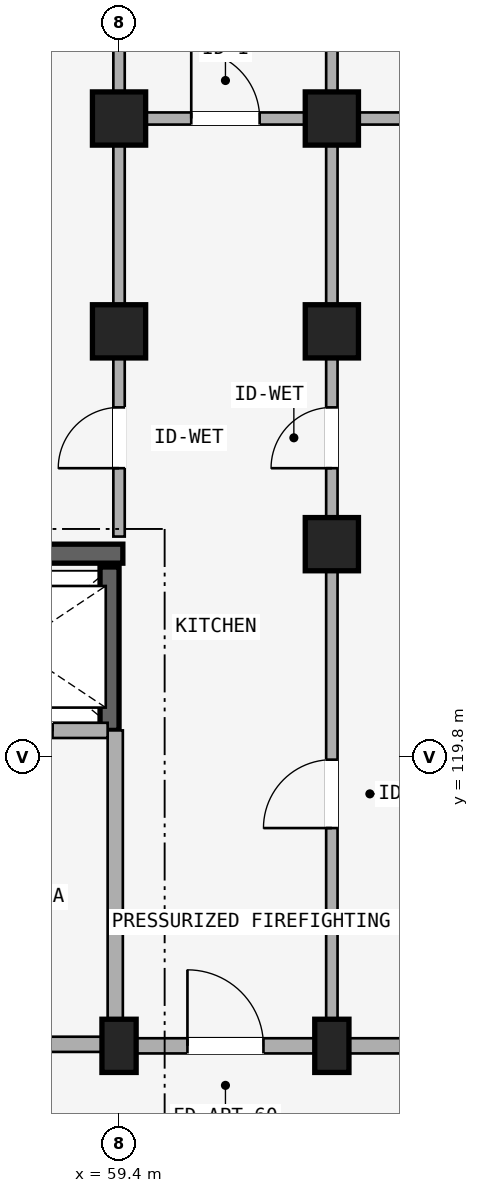
"""IFC4 building model, lengths in metres.
Left out: names, types, materials, properties, quantities, classifications, styles, units other than length and angle.
Written with IfcOpenShell. Run it as: python <this file> out.ifc"""

import sys

from ifc_helpers import new_model, si_unit, direction, frame, frame_2d, origin, origin_2d, place, context, subcontext, project, spatial, rectangle, extrude, element, fill, save


model = new_model("IFC4")
c1 = context("Model", 3, precision=1e-05, world=origin(), true_north=direction((0.0, 1.0)))
c2 = subcontext(c1, "Body", "Model", "MODEL_VIEW")
j1 = project(units=[si_unit("LENGTHUNIT", "METRE"), si_unit("PLANEANGLEUNIT", "RADIAN")], contexts=[c1])
p1 = place(None, origin())
s1 = spatial("IfcSite", under=j1, at=p1, CompositionType="ELEMENT")
p2 = place(p1, origin())
s2 = spatial("IfcBuilding", under=s1, at=p2, CompositionType="ELEMENT")
p3 = place(p2, frame((0.0, 0.0, 21.3)))
s3 = spatial("IfcBuildingStorey", under=s2, at=p3, CompositionType="ELEMENT", Elevation=21.3)
p4 = place(p3, frame((56.65, 122.475, 0.0), z_axis=(0.0, 0.0, 1.0), x_axis=(1.0, 0.0, 0.0)))
e1 = element("IfcWall", 1, at=p4, inside=s3, PredefinedType="SHEAR", context=c2, shape_type="SweptSolid", body=[
    extrude(rectangle(XDim=2.8, YDim=0.25, at=frame_2d((1.4, 0.0))), origin(), (0.0, 0.0, 1.0), 2.93),
])
p5 = place(p3, frame((59.275, 120.15, 0.0), z_axis=(0.0, 0.0, 1.0), x_axis=(0.0, 1.0, 0.0)))
e2 = element("IfcWall", 2, at=p5, inside=s3, PredefinedType="SHEAR", context=c2, shape_type="SweptSolid", body=[
    extrude(rectangle(XDim=2.15, YDim=0.25, at=frame_2d((1.075, 0.0))), origin(), (0.0, 0.0, 1.0), 2.93),
])
p6 = place(p3, frame((59.4, 116.0, 0.0), z_axis=(0.0, 0.0, 1.0), x_axis=(1.0, 0.0, 0.0)))
e3 = element("IfcColumn", 3, at=p6, inside=s3, PredefinedType="COLUMN", context=c2, shape_type="SweptSolid", body=[
    extrude(rectangle(XDim=0.45, YDim=0.7, at=origin_2d()), origin(), (0.0, 0.0, 1.0), 2.93),
])
for number, where, z_axis, x_axis in (
    (4, (59.4, 125.4, 0.0), (0.0, 0.0, 1.0), (1.0, 0.0, 0.0)),
    (5, (59.4, 128.2, 0.0), (0.0, 0.0, 1.0), (1.0, 0.0, 0.0)),
):
    element("IfcColumn", number, at=place(p3, frame(where, z_axis=z_axis, x_axis=x_axis)), inside=s3, PredefinedType="COLUMN", context=c2, shape_type="SweptSolid", body=[
        extrude(rectangle(XDim=0.7, YDim=0.7, at=origin_2d()), origin(), (0.0, 0.0, 1.0), 2.93),
    ])
p7 = place(p3, frame((62.2, 116.0, 0.0), z_axis=(0.0, 0.0, 1.0), x_axis=(1.0, 0.0, 0.0)))
e6 = element("IfcColumn", 6, at=p7, inside=s3, PredefinedType="COLUMN", context=c2, shape_type="SweptSolid", body=[
    extrude(rectangle(XDim=0.45, YDim=0.7, at=origin_2d()), origin(), (0.0, 0.0, 1.0), 2.93),
])
for number, where, z_axis, x_axis in (
    (7, (62.2, 122.6, 0.0), (0.0, 0.0, 1.0), (1.0, 0.0, 0.0)),
    (8, (62.2, 125.4, 0.0), (0.0, 0.0, 1.0), (1.0, 0.0, 0.0)),
    (9, (62.2, 128.2, 0.0), (0.0, 0.0, 1.0), (1.0, 0.0, 0.0)),
):
    element("IfcColumn", number, at=place(p3, frame(where, z_axis=z_axis, x_axis=x_axis)), inside=s3, PredefinedType="COLUMN", context=c2, shape_type="SweptSolid", body=[
        extrude(rectangle(XDim=0.7, YDim=0.7, at=origin_2d()), origin(), (0.0, 0.0, 1.0), 2.93),
    ])
p8 = place(p3, frame((53.7, 116.02, 0.0), z_axis=(0.0, 0.0, 1.0), x_axis=(1.0, 0.0, 0.0)))
e10 = element("IfcWall", 10, at=p8, inside=s3, PredefinedType="STANDARD", context=c2, shape_type="SweptSolid", body=[
    extrude(rectangle(XDim=5.65, YDim=0.2, at=frame_2d((2.825, 0.0))), origin(), (0.0, 0.0, 1.0), 2.372),
])
p9 = place(p8, frame((1.923, 0.0, 0.0)))
e11 = element("IfcOpeningElement", 11, at=p9, cuts=e10, PredefinedType="OPENING", context=c2, shape_type="SweptSolid", body=[
    extrude(rectangle(XDim=1.24, YDim=2.15, at=frame_2d((0.62, 1.075))), frame((0.0, 0.11, 0.0), z_axis=(0.0, -1.0, 0.0), x_axis=(1.0, 0.0, 0.0)), (0.0, 0.0, 1.0), 0.22),
])
p10 = place(p3, frame((59.35, 116.02, 0.0), z_axis=(0.0, 0.0, 1.0), x_axis=(0.0, 1.0, 0.0)))
e12 = element("IfcWall", 12, at=p10, inside=s3, PredefinedType="STANDARD", context=c2, shape_type="SweptSolid", body=[
    extrude(rectangle(XDim=4.13, YDim=0.2, at=frame_2d((2.065, 0.0))), origin(), (0.0, 0.0, 1.0), 2.372),
])
p11 = place(p3, frame((56.7, 120.15, 0.0), z_axis=(0.0, 0.0, 1.0), x_axis=(1.0, 0.0, 0.0)))
e13 = element("IfcWall", 13, at=p11, inside=s3, PredefinedType="STANDARD", context=c2, shape_type="SweptSolid", body=[
    extrude(rectangle(XDim=2.55, YDim=0.2, at=frame_2d((1.275, 0.0))), origin(), (0.0, 0.0, 1.0), 2.372),
])
p12 = place(p11, frame((0.725, 0.0, 0.0)))
e14 = element("IfcOpeningElement", 14, at=p12, cuts=e13, PredefinedType="OPENING", context=c2, shape_type="SweptSolid", body=[
    extrude(rectangle(XDim=1.1, YDim=2.15, at=frame_2d((0.55, 1.075))), frame((0.0, 0.11, 0.0), z_axis=(0.0, -1.0, 0.0), x_axis=(1.0, 0.0, 0.0)), (0.0, 0.0, 1.0), 0.22),
])
p13 = place(p3, frame((59.4, 116.0, 0.0), z_axis=(0.0, 0.0, 1.0), x_axis=(1.0, 0.0, 0.0)))
e15 = element("IfcWall", 15, at=p13, inside=s3, PredefinedType="STANDARD", context=c2, shape_type="SweptSolid", body=[
    extrude(rectangle(XDim=2.8, YDim=0.2, at=frame_2d((1.4, 0.0))), origin(), (0.0, 0.0, 1.0), 2.372),
])
p14 = place(p13, frame((0.9, 0.0, 0.0)))
e16 = element("IfcOpeningElement", 16, at=p14, cuts=e15, PredefinedType="OPENING", context=c2, shape_type="SweptSolid", body=[
    extrude(rectangle(XDim=1.0, YDim=2.15, at=frame_2d((0.5, 1.075))), frame((0.0, 0.11, 0.0), z_axis=(0.0, -1.0, 0.0), x_axis=(1.0, 0.0, 0.0)), (0.0, 0.0, 1.0), 0.22),
])
p15 = place(p3, frame((59.48, 128.2, 0.0), z_axis=(0.0, 0.0, 1.0), x_axis=(1.0, 0.0, 0.0)))
e17 = element("IfcWall", 17, at=p15, inside=s3, PredefinedType="PLUMBINGWALL", context=c2, shape_type="SweptSolid", body=[
    extrude(rectangle(XDim=2.64, YDim=0.16, at=frame_2d((1.32, 0.0))), origin(), (0.0, 0.0, 1.0), 2.372),
])
p16 = place(p15, frame((0.87, 0.0, 0.0)))
e18 = element("IfcOpeningElement", 18, at=p16, cuts=e17, PredefinedType="OPENING", context=c2, shape_type="SweptSolid", body=[
    extrude(rectangle(XDim=0.9, YDim=2.1, at=frame_2d((0.45, 1.05))), frame((0.0, 0.09, 0.0), z_axis=(0.0, -1.0, 0.0), x_axis=(1.0, 0.0, 0.0)), (0.0, 0.0, 1.0), 0.18),
])
p17 = place(p3, frame((62.2, 116.0, 0.0), z_axis=(0.0, 0.0, 1.0), x_axis=(1.0, 0.0, 0.0)))
e19 = element("IfcWall", 19, at=p17, inside=s3, PredefinedType="STANDARD", context=c2, shape_type="SweptSolid", body=[
    extrude(rectangle(XDim=2.8, YDim=0.2, at=frame_2d((1.4, 0.0))), origin(), (0.0, 0.0, 1.0), 2.372),
])
p18 = place(p3, frame((62.28, 128.2, 0.0), z_axis=(0.0, 0.0, 1.0), x_axis=(1.0, 0.0, 0.0)))
e20 = element("IfcWall", 20, at=p18, inside=s3, PredefinedType="PLUMBINGWALL", context=c2, shape_type="SweptSolid", body=[
    extrude(rectangle(XDim=2.64, YDim=0.16, at=frame_2d((1.32, 0.0))), origin(), (0.0, 0.0, 1.0), 2.372),
])
p19 = place(p18, frame((0.92, 0.0, 0.0)))
e21 = element("IfcOpeningElement", 21, at=p19, cuts=e20, PredefinedType="OPENING", context=c2, shape_type="SweptSolid", body=[
    extrude(rectangle(XDim=0.8, YDim=2.1, at=frame_2d((0.4, 1.05))), frame((0.0, 0.09, 0.0), z_axis=(0.0, -1.0, 0.0), x_axis=(1.0, 0.0, 0.0)), (0.0, 0.0, 1.0), 0.18),
])
p20 = place(p3, frame((59.4, 122.7, 0.0), z_axis=(0.0, 0.0, 1.0), x_axis=(0.0, 1.0, 0.0)))
e22 = element("IfcWall", 22, at=p20, inside=s3, PredefinedType="PARTITIONING", context=c2, shape_type="SweptSolid", body=[
    extrude(rectangle(XDim=10.82, YDim=0.15, at=frame_2d((5.41, 0.0))), origin(), (0.0, 0.0, 1.0), 2.372),
])
p21 = place(p20, frame((0.899, 0.0, 0.0)))
e23 = element("IfcOpeningElement", 23, at=p21, cuts=e22, PredefinedType="OPENING", context=c2, shape_type="SweptSolid", body=[
    extrude(rectangle(XDim=0.8, YDim=2.1, at=frame_2d((0.4, 1.05))), frame((0.0, 0.085, 0.0), z_axis=(0.0, -1.0, 0.0), x_axis=(1.0, 0.0, 0.0)), (0.0, 0.0, 1.0), 0.17),
])
p22 = place(p3, frame((62.2, 116.05, 0.0), z_axis=(0.0, 0.0, 1.0), x_axis=(0.0, 1.0, 0.0)))
e24 = element("IfcWall", 24, at=p22, inside=s3, PredefinedType="PARTITIONING", context=c2, shape_type="SweptSolid", body=[
    extrude(rectangle(XDim=6.53, YDim=0.15, at=frame_2d((3.265, 0.0))), origin(), (0.0, 0.0, 1.0), 2.372),
])
p23 = place(p22, frame((2.815, 0.0, 0.0)))
e25 = element("IfcOpeningElement", 25, at=p23, cuts=e24, PredefinedType="OPENING", context=c2, shape_type="SweptSolid", body=[
    extrude(rectangle(XDim=0.9, YDim=2.1, at=frame_2d((0.45, 1.05))), frame((0.0, 0.085, 0.0), z_axis=(0.0, -1.0, 0.0), x_axis=(1.0, 0.0, 0.0)), (0.0, 0.0, 1.0), 0.17),
])
p24 = place(p3, frame((62.2, 122.7, 0.0), z_axis=(0.0, 0.0, 1.0), x_axis=(0.0, 1.0, 0.0)))
e26 = element("IfcWall", 26, at=p24, inside=s3, PredefinedType="PARTITIONING", context=c2, shape_type="SweptSolid", body=[
    extrude(rectangle(XDim=10.82, YDim=0.15, at=frame_2d((5.41, 0.0))), origin(), (0.0, 0.0, 1.0), 2.372),
])
p25 = place(p24, frame((0.899, 0.0, 0.0)))
e27 = element("IfcOpeningElement", 27, at=p25, cuts=e26, PredefinedType="OPENING", context=c2, shape_type="SweptSolid", body=[
    extrude(rectangle(XDim=0.8, YDim=2.1, at=frame_2d((0.4, 1.05))), frame((0.0, 0.085, 0.0), z_axis=(0.0, -1.0, 0.0), x_axis=(1.0, 0.0, 0.0)), (0.0, 0.0, 1.0), 0.17),
])
p26 = place(p12, origin())
e28 = element("IfcDoor", 28, at=p26, inside=s3, OperationType="SLIDING_TO_LEFT", PredefinedType="DOOR", context=c2, shape_type="SweptSolid", body=[
    extrude(rectangle(XDim=1.1, YDim=2.15, at=frame_2d((0.55, 1.075))), frame((0.0, 0.025, 0.0), z_axis=(0.0, -1.0, 0.0), x_axis=(1.0, 0.0, 0.0)), (0.0, 0.0, 1.0), 0.05),
])
fill(e14, e28)
p27 = place(p16, frame((0.9, 0.0, 0.0), z_axis=(0.0, 0.0, 1.0), x_axis=(-1.0, 0.0, 0.0)))
e29 = element("IfcDoor", 29, at=p27, inside=s3, OperationType="SINGLE_SWING_RIGHT", PredefinedType="DOOR", context=c2, shape_type="SweptSolid", body=[
    extrude(rectangle(XDim=0.9, YDim=2.1, at=frame_2d((0.45, 1.05))), frame((0.0, 0.025, 0.0), z_axis=(0.0, -1.0, 0.0), x_axis=(1.0, 0.0, 0.0)), (0.0, 0.0, 1.0), 0.05),
])
fill(e18, e29)
p28 = place(p14, origin())
e30 = element("IfcDoor", 30, at=p28, inside=s3, OperationType="SINGLE_SWING_LEFT", PredefinedType="DOOR", context=c2, shape_type="SweptSolid", body=[
    extrude(rectangle(XDim=1.0, YDim=2.15, at=frame_2d((0.5, 1.075))), frame((0.0, 0.025, 0.0), z_axis=(0.0, -1.0, 0.0), x_axis=(1.0, 0.0, 0.0)), (0.0, 0.0, 1.0), 0.05),
])
fill(e16, e30)
p29 = place(p21, origin())
e31 = element("IfcDoor", 31, at=p29, inside=s3, OperationType="SINGLE_SWING_LEFT", PredefinedType="DOOR", context=c2, shape_type="SweptSolid", body=[
    extrude(rectangle(XDim=0.8, YDim=2.1, at=frame_2d((0.4, 1.05))), frame((0.0, 0.025, 0.0), z_axis=(0.0, -1.0, 0.0), x_axis=(1.0, 0.0, 0.0)), (0.0, 0.0, 1.0), 0.05),
])
fill(e23, e31)
p30 = place(p23, origin())
e32 = element("IfcDoor", 32, at=p30, inside=s3, OperationType="SINGLE_SWING_LEFT", PredefinedType="DOOR", context=c2, shape_type="SweptSolid", body=[
    extrude(rectangle(XDim=0.9, YDim=2.1, at=frame_2d((0.45, 1.05))), frame((0.0, 0.025, 0.0), z_axis=(0.0, -1.0, 0.0), x_axis=(1.0, 0.0, 0.0)), (0.0, 0.0, 1.0), 0.05),
])
fill(e25, e32)
p31 = place(p25, frame((0.8, 0.0, 0.0), z_axis=(0.0, 0.0, 1.0), x_axis=(-1.0, 0.0, 0.0)))
e33 = element("IfcDoor", 33, at=p31, inside=s3, OperationType="SINGLE_SWING_RIGHT", PredefinedType="DOOR", context=c2, shape_type="SweptSolid", body=[
    extrude(rectangle(XDim=0.8, YDim=2.1, at=frame_2d((0.4, 1.05))), frame((0.0, 0.025, 0.0), z_axis=(0.0, -1.0, 0.0), x_axis=(1.0, 0.0, 0.0)), (0.0, 0.0, 1.0), 0.05),
])
fill(e27, e33)
save(model, sys.argv[1])
